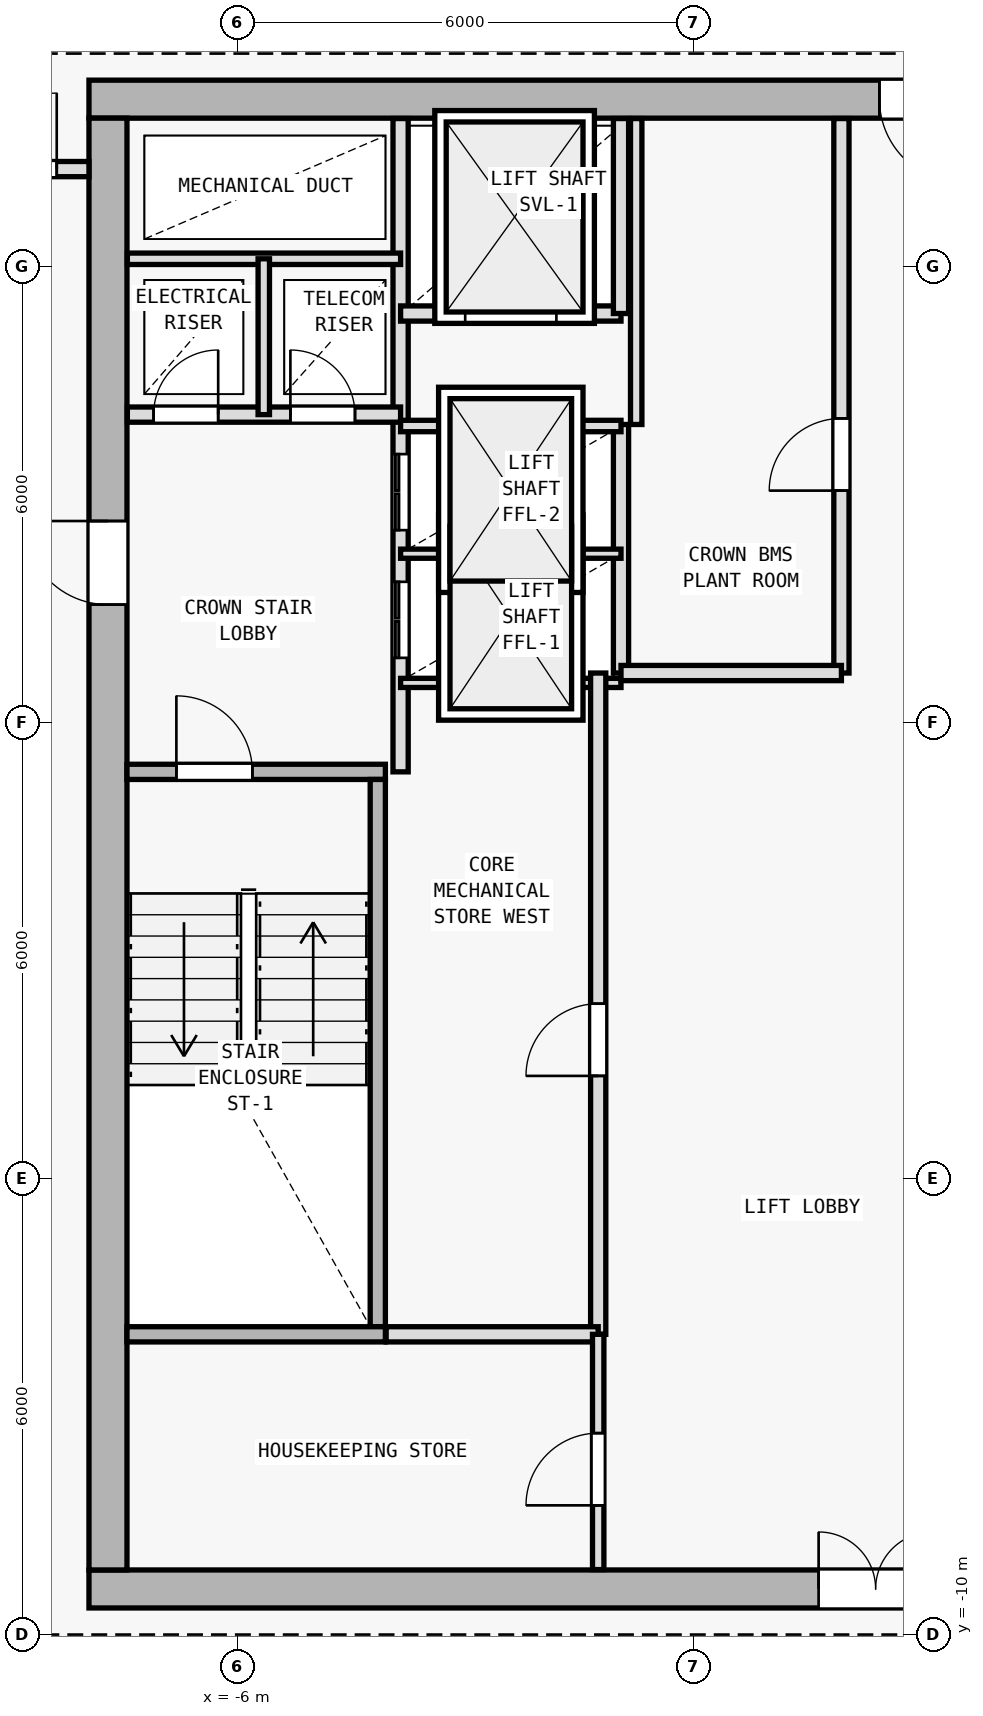
"""IFC4 building model, lengths in metres.
Left out: names, types, materials, properties, quantities, classifications, styles, units other than length and angle.
Written with IfcOpenShell. Run it as: python <this file> out.ifc"""

import sys

from ifc_helpers import new_model, si_unit, direction, frame, frame_2d, origin, origin_2d, place, context, subcontext, project, spatial, rectangle, i_section, extrude, element, fill, save


model = new_model("IFC4")
c1 = context("Model", 3, precision=1e-05, world=origin(), true_north=direction((0.0, 1.0)))
c2 = subcontext(c1, "Body", "Model", "MODEL_VIEW")
j1 = project(units=[si_unit("LENGTHUNIT", "METRE"), si_unit("PLANEANGLEUNIT", "RADIAN")], contexts=[c1])
p1 = place(None, origin())
s1 = spatial("IfcSite", under=j1, at=p1, CompositionType="ELEMENT")
p2 = place(p1, origin())
s2 = spatial("IfcBuilding", under=s1, at=p2, CompositionType="ELEMENT")
p3 = place(p2, frame((0.0, 0.0, 315.6)))
s3 = spatial("IfcBuildingStorey", under=s2, at=p3, CompositionType="ELEMENT", Elevation=315.6)
for number, where, z_axis, x_axis in (
    (1, (-7.7, -9.4, 0.0), (0.0, 0.0, 1.0), (1.0, 0.0, 0.0)),
    (2, (-7.7, 10.2, 0.0), (0.0, 0.0, 1.0), (1.0, 0.0, 0.0)),
    (3, (0.0, -9.4, 0.0), (0.0, 0.0, 1.0), (1.0, 0.0, 0.0)),
    (4, (-7.7, 2.0, 0.0), (0.0, 0.0, 1.0), (1.0, 0.0, 0.0)),
):
    element("IfcColumn", number, at=place(p3, frame(where, z_axis=z_axis, x_axis=x_axis)), inside=s3, PredefinedType="COLUMN", context=c2, shape_type="SweptSolid", body=[
        extrude(i_section(OverallWidth=0.374, OverallDepth=0.372, WebThickness=0.012, FlangeThickness=0.02, FilletRadius=0.015, at=origin_2d()), origin(), (0.0, 0.0, 1.0), 3.6),
    ])
p4 = place(p3, frame((-7.95, -9.4, 0.0), z_axis=(0.0, 0.0, 1.0), x_axis=(1.0, 0.0, 0.0)))
e5 = element("IfcWall", 5, at=p4, inside=s3, PredefinedType="SHEAR", context=c2, shape_type="SweptSolid", body=[
    extrude(rectangle(XDim=15.9, YDim=0.5, at=frame_2d((7.95, 0.0))), origin(), (0.0, 0.0, 1.0), 3.34),
])
p5 = place(p4, frame((9.6, 0.0, 0.0)))
e6 = element("IfcOpeningElement", 6, at=p5, cuts=e5, PredefinedType="OPENING", context=c2, shape_type="SweptSolid", body=[
    extrude(rectangle(XDim=1.5, YDim=2.2, at=frame_2d((0.75, 1.1))), frame((0.0, 0.26, 0.0), z_axis=(0.0, -1.0, 0.0), x_axis=(1.0, 0.0, 0.0)), (0.0, 0.0, 1.0), 0.52),
])
p6 = place(p3, frame((7.95, 10.2, 0.0), z_axis=(0.0, 0.0, 1.0), x_axis=(-1.0, 0.0, 0.0)))
e7 = element("IfcWall", 7, at=p6, inside=s3, PredefinedType="SHEAR", context=c2, shape_type="SweptSolid", body=[
    extrude(rectangle(XDim=15.9, YDim=0.5, at=frame_2d((7.95, 0.0))), origin(), (0.0, 0.0, 1.0), 3.34),
])
p7 = place(p6, frame((4.4, 0.0, 0.0)))
e8 = element("IfcOpeningElement", 8, at=p7, cuts=e7, PredefinedType="OPENING", context=c2, shape_type="SweptSolid", body=[
    extrude(rectangle(XDim=1.1, YDim=2.15, at=frame_2d((0.55, 1.075))), frame((0.0, 0.26, 0.0), z_axis=(0.0, -1.0, 0.0), x_axis=(1.0, 0.0, 0.0)), (0.0, 0.0, 1.0), 0.52),
])
p8 = place(p3, frame((-7.7, -9.15, 0.0), z_axis=(0.0, 0.0, 1.0), x_axis=(0.0, 1.0, 0.0)))
e9 = element("IfcWall", 9, at=p8, inside=s3, PredefinedType="SHEAR", context=c2, shape_type="SweptSolid", body=[
    extrude(rectangle(XDim=19.1, YDim=0.5, at=frame_2d((9.55, 0.0))), origin(), (0.0, 0.0, 1.0), 3.34),
])
p9 = place(p8, frame((12.7, 0.0, 0.0)))
e10 = element("IfcOpeningElement", 10, at=p9, cuts=e9, PredefinedType="OPENING", context=c2, shape_type="SweptSolid", body=[
    extrude(rectangle(XDim=1.1, YDim=2.15, at=frame_2d((0.55, 1.075))), frame((0.0, 0.26, 0.0), z_axis=(0.0, -1.0, 0.0), x_axis=(1.0, 0.0, 0.0)), (0.0, 0.0, 1.0), 0.52),
])
p10 = place(p3, frame((-7.45, 1.35, 0.0), z_axis=(0.0, 0.0, 1.0), x_axis=(1.0, 0.0, 0.0)))
e11 = element("IfcWall", 11, at=p10, inside=s3, PredefinedType="SOLIDWALL", context=c2, shape_type="SweptSolid", body=[
    extrude(rectangle(XDim=3.4, YDim=0.2, at=frame_2d((1.7, 0.0))), origin(), (0.0, 0.0, 1.0), 3.34),
])
p11 = place(p10, frame((0.65, 0.0, 0.0)))
e12 = element("IfcOpeningElement", 12, at=p11, cuts=e11, PredefinedType="OPENING", context=c2, shape_type="SweptSolid", body=[
    extrude(rectangle(XDim=1.0, YDim=2.15, at=frame_2d((0.5, 1.075))), frame((0.0, 0.11, 0.0), z_axis=(0.0, -1.0, 0.0), x_axis=(1.0, 0.0, 0.0)), (0.0, 0.0, 1.0), 0.22),
])
p12 = place(p3, frame((-4.15, -5.95, 0.0), z_axis=(0.0, 0.0, 1.0), x_axis=(0.0, 1.0, 0.0)))
e13 = element("IfcWall", 13, at=p12, inside=s3, PredefinedType="SOLIDWALL", context=c2, shape_type="SweptSolid", body=[
    extrude(rectangle(XDim=7.2, YDim=0.2, at=frame_2d((3.6, 0.0))), origin(), (0.0, 0.0, 1.0), 3.34),
])
p13 = place(p3, frame((-3.85, 1.35, 0.0), z_axis=(0.0, 0.0, 1.0), x_axis=(0.0, 1.0, 0.0)))
e14 = element("IfcWall", 14, at=p13, inside=s3, PredefinedType="SOLIDWALL", context=c2, shape_type="SweptSolid", body=[
    extrude(rectangle(XDim=8.595, YDim=0.2, at=frame_2d((4.297, 0.0))), origin(), (0.0, 0.0, 1.0), 3.34),
])
p14 = place(p13, frame((1.5, 0.0, 0.0)))
e15 = element("IfcOpeningElement", 15, at=p14, cuts=e14, PredefinedType="OPENING", context=c2, shape_type="SweptSolid", body=[
    extrude(rectangle(XDim=1.0, YDim=2.15, at=frame_2d((0.5, 1.075))), frame((0.0, 0.11, 0.0), z_axis=(0.0, -1.0, 0.0), x_axis=(1.0, 0.0, 0.0)), (0.0, 0.0, 1.0), 0.22),
])
p15 = place(p13, frame((3.18, 0.0, 0.0)))
e16 = element("IfcOpeningElement", 16, at=p15, cuts=e14, PredefinedType="OPENING", context=c2, shape_type="SweptSolid", body=[
    extrude(rectangle(XDim=1.0, YDim=2.15, at=frame_2d((0.5, 1.075))), frame((0.0, 0.11, 0.0), z_axis=(0.0, -1.0, 0.0), x_axis=(1.0, 0.0, 0.0)), (0.0, 0.0, 1.0), 0.22),
])
p16 = place(p3, frame((-7.445, 6.05, 0.0), z_axis=(0.0, 0.0, 1.0), x_axis=(1.0, 0.0, 0.0)))
e17 = element("IfcWall", 17, at=p16, inside=s3, PredefinedType="SOLIDWALL", context=c2, shape_type="SweptSolid", body=[
    extrude(rectangle(XDim=3.595, YDim=0.2, at=frame_2d((1.797, 0.0))), origin(), (0.0, 0.0, 1.0), 3.34),
])
p17 = place(p16, frame((0.345, 0.0, 0.0)))
e18 = element("IfcOpeningElement", 18, at=p17, cuts=e17, PredefinedType="OPENING", context=c2, shape_type="SweptSolid", body=[
    extrude(rectangle(XDim=0.85, YDim=2.1, at=frame_2d((0.425, 1.05))), frame((0.0, 0.11, 0.0), z_axis=(0.0, -1.0, 0.0), x_axis=(1.0, 0.0, 0.0)), (0.0, 0.0, 1.0), 0.22),
])
p18 = place(p16, frame((2.145, 0.0, 0.0)))
e19 = element("IfcOpeningElement", 19, at=p18, cuts=e17, PredefinedType="OPENING", context=c2, shape_type="SweptSolid", body=[
    extrude(rectangle(XDim=0.85, YDim=2.1, at=frame_2d((0.425, 1.05))), frame((0.0, 0.11, 0.0), z_axis=(0.0, -1.0, 0.0), x_axis=(1.0, 0.0, 0.0)), (0.0, 0.0, 1.0), 0.22),
])
p19 = place(p3, frame((-7.445, 8.1, 0.0), z_axis=(0.0, 0.0, 1.0), x_axis=(1.0, 0.0, 0.0)))
e20 = element("IfcWall", 20, at=p19, inside=s3, PredefinedType="PARTITIONING", context=c2, shape_type="SweptSolid", body=[
    extrude(rectangle(XDim=3.595, YDim=0.15, at=frame_2d((1.797, 0.0))), origin(), (0.0, 0.0, 1.0), 3.34),
])
p20 = place(p3, frame((-5.65, 6.05, 0.0), z_axis=(0.0, 0.0, 1.0), x_axis=(0.0, 1.0, 0.0)))
e21 = element("IfcWall", 21, at=p20, inside=s3, PredefinedType="PARTITIONING", context=c2, shape_type="SweptSolid", body=[
    extrude(rectangle(XDim=2.05, YDim=0.15, at=frame_2d((1.025, 0.0))), origin(), (0.0, 0.0, 1.0), 3.34),
])
p21 = place(p3, frame((-0.95, 2.65, 0.0), z_axis=(0.0, 0.0, 1.0), x_axis=(0.0, 1.0, 0.0)))
e22 = element("IfcWall", 22, at=p21, inside=s3, PredefinedType="SOLIDWALL", context=c2, shape_type="SweptSolid", body=[
    extrude(rectangle(XDim=3.27, YDim=0.2, at=frame_2d((1.635, 0.0))), origin(), (0.0, 0.0, 1.0), 3.34),
])
for number, where, z_axis, x_axis in (
    (23, (-3.85, 2.52, 0.0), (0.0, 0.0, 1.0), (1.0, 0.0, 0.0)),
    (24, (-3.85, 4.22, 0.0), (0.0, 0.0, 1.0), (1.0, 0.0, 0.0)),
):
    element("IfcWall", number, at=place(p3, frame(where, z_axis=z_axis, x_axis=x_axis)), inside=s3, PredefinedType="PARTITIONING", context=c2, shape_type="SweptSolid", body=[
        extrude(rectangle(XDim=2.9, YDim=0.12, at=frame_2d((1.45, 0.0))), origin(), (0.0, 0.0, 1.0), 3.34),
    ])
p22 = place(p3, frame((-3.85, 5.9, 0.0), z_axis=(0.0, 0.0, 1.0), x_axis=(1.0, 0.0, 0.0)))
e25 = element("IfcWall", 25, at=p22, inside=s3, PredefinedType="PARTITIONING", context=c2, shape_type="SweptSolid", body=[
    extrude(rectangle(XDim=2.9, YDim=0.15, at=frame_2d((1.45, 0.0))), origin(), (0.0, 0.0, 1.0), 3.34),
])
p23 = place(p3, frame((-3.85, 7.38, 0.0), z_axis=(0.0, 0.0, 1.0), x_axis=(1.0, 0.0, 0.0)))
e26 = element("IfcWall", 26, at=p23, inside=s3, PredefinedType="SOLIDWALL", context=c2, shape_type="SweptSolid", body=[
    extrude(rectangle(XDim=2.9, YDim=0.2, at=frame_2d((1.45, 0.0))), origin(), (0.0, 0.0, 1.0), 3.34),
])
p24 = place(p23, frame((0.85, 0.0, 0.0)))
e27 = element("IfcOpeningElement", 27, at=p24, cuts=e26, PredefinedType="OPENING", context=c2, shape_type="SweptSolid", body=[
    extrude(rectangle(XDim=1.2, YDim=2.2, at=frame_2d((0.6, 1.1))), frame((0.0, 0.11, 0.0), z_axis=(0.0, -1.0, 0.0), x_axis=(1.0, 0.0, 0.0)), (0.0, 0.0, 1.0), 0.22),
])
p25 = place(p3, frame((-0.95, 7.38, 0.0), z_axis=(0.0, 0.0, 1.0), x_axis=(0.0, 1.0, 0.0)))
e28 = element("IfcWall", 28, at=p25, inside=s3, PredefinedType="SOLIDWALL", context=c2, shape_type="SweptSolid", body=[
    extrude(rectangle(XDim=2.565, YDim=0.2, at=frame_2d((1.283, 0.0))), origin(), (0.0, 0.0, 1.0), 3.34),
])
p26 = place(p3, frame((-1.25, -6.05, 0.0), z_axis=(0.0, 0.0, 1.0), x_axis=(0.0, 1.0, 0.0)))
e29 = element("IfcWall", 29, at=p26, inside=s3, PredefinedType="SOLIDWALL", context=c2, shape_type="SweptSolid", body=[
    extrude(rectangle(XDim=8.7, YDim=0.2, at=frame_2d((4.35, 0.0))), origin(), (0.0, 0.0, 1.0), 3.34),
])
p27 = place(p26, frame((3.4, 0.0, 0.0)))
e30 = element("IfcOpeningElement", 30, at=p27, cuts=e29, PredefinedType="OPENING", context=c2, shape_type="SweptSolid", body=[
    extrude(rectangle(XDim=0.95, YDim=2.1, at=frame_2d((0.475, 1.05))), frame((0.0, 0.11, 0.0), z_axis=(0.0, -1.0, 0.0), x_axis=(1.0, 0.0, 0.0)), (0.0, 0.0, 1.0), 0.22),
])
p28 = place(p3, frame((1.95, 2.65, 0.0), z_axis=(0.0, 0.0, 1.0), x_axis=(0.0, 1.0, 0.0)))
e31 = element("IfcWall", 31, at=p28, inside=s3, PredefinedType="SOLIDWALL", context=c2, shape_type="SweptSolid", body=[
    extrude(rectangle(XDim=7.295, YDim=0.2, at=frame_2d((3.647, 0.0))), origin(), (0.0, 0.0, 1.0), 3.34),
])
p29 = place(p28, frame((2.4, 0.0, 0.0)))
e32 = element("IfcOpeningElement", 32, at=p29, cuts=e31, PredefinedType="OPENING", context=c2, shape_type="SweptSolid", body=[
    extrude(rectangle(XDim=0.95, YDim=2.1, at=frame_2d((0.475, 1.05))), frame((0.0, 0.11, 0.0), z_axis=(0.0, -1.0, 0.0), x_axis=(1.0, 0.0, 0.0)), (0.0, 0.0, 1.0), 0.22),
])
p30 = place(p3, frame((-0.95, 2.65, 0.0), z_axis=(0.0, 0.0, 1.0), x_axis=(1.0, 0.0, 0.0)))
e33 = element("IfcWall", 33, at=p30, inside=s3, PredefinedType="SOLIDWALL", context=c2, shape_type="SweptSolid", body=[
    extrude(rectangle(XDim=2.9, YDim=0.2, at=frame_2d((1.45, 0.0))), origin(), (0.0, 0.0, 1.0), 3.34),
])
p31 = place(p3, frame((-0.75, 5.92, 0.0), z_axis=(0.0, 0.0, 1.0), x_axis=(0.0, 1.0, 0.0)))
e34 = element("IfcWall", 34, at=p31, inside=s3, PredefinedType="PARTITIONING", context=c2, shape_type="SweptSolid", body=[
    extrude(rectangle(XDim=4.025, YDim=0.15, at=frame_2d((2.013, 0.0))), origin(), (0.0, 0.0, 1.0), 3.34),
])
p32 = place(p3, frame((-7.45, -6.05, 0.0), z_axis=(0.0, 0.0, 1.0), x_axis=(1.0, 0.0, 0.0)))
e35 = element("IfcWall", 35, at=p32, inside=s3, PredefinedType="SOLIDWALL", context=c2, shape_type="SweptSolid", body=[
    extrude(rectangle(XDim=3.4, YDim=0.2, at=frame_2d((1.7, 0.0))), origin(), (0.0, 0.0, 1.0), 3.34),
])
p33 = place(p3, frame((-4.04, -6.05, 0.0), z_axis=(0.0, 0.0, 1.0), x_axis=(1.0, 0.0, 0.0)))
e36 = element("IfcWall", 36, at=p33, inside=s3, PredefinedType="SOLIDWALL", context=c2, shape_type="SweptSolid", body=[
    extrude(rectangle(XDim=2.79, YDim=0.2, at=frame_2d((1.395, 0.0))), origin(), (0.0, 0.0, 1.0), 3.34),
])
p34 = place(p3, frame((-1.25, -9.145, 0.0), z_axis=(0.0, 0.0, 1.0), x_axis=(0.0, 1.0, 0.0)))
e37 = element("IfcWall", 37, at=p34, inside=s3, PredefinedType="PARTITIONING", context=c2, shape_type="SweptSolid", body=[
    extrude(rectangle(XDim=3.095, YDim=0.15, at=frame_2d((1.547, 0.0))), origin(), (0.0, 0.0, 1.0), 3.34),
])
p35 = place(p34, frame((0.845, 0.0, 0.0)))
e38 = element("IfcOpeningElement", 38, at=p35, cuts=e37, PredefinedType="OPENING", context=c2, shape_type="SweptSolid", body=[
    extrude(rectangle(XDim=0.95, YDim=2.1, at=frame_2d((0.475, 1.05))), frame((0.0, 0.085, 0.0), z_axis=(0.0, -1.0, 0.0), x_axis=(1.0, 0.0, 0.0)), (0.0, 0.0, 1.0), 0.17),
])
p36 = place(p3, frame((-9.848, 9.28, 0.0), z_axis=(0.0, 0.0, 1.0), x_axis=(1.0, 0.0, 0.0)))
e39 = element("IfcWall", 39, at=p36, inside=s3, PredefinedType="SOLIDWALL", context=c2, shape_type="SweptSolid", body=[
    extrude(rectangle(XDim=1.898, YDim=0.2, at=frame_2d((0.949, 0.0))), origin(), (0.0, 0.0, 1.0), 3.34),
])
p37 = place(p36, frame((0.474, 0.0, 0.0)))
e40 = element("IfcOpeningElement", 40, at=p37, cuts=e39, PredefinedType="OPENING", context=c2, shape_type="SweptSolid", body=[
    extrude(rectangle(XDim=1.0, YDim=2.15, at=frame_2d((0.5, 1.075))), frame((0.0, 0.11, 0.0), z_axis=(0.0, -1.0, 0.0), x_axis=(1.0, 0.0, 0.0)), (0.0, 0.0, 1.0), 0.22),
])
p38 = place(p5, origin())
e41 = element("IfcDoor", 41, at=p38, inside=s3, OperationType="DOUBLE_DOOR_SINGLE_SWING", PredefinedType="DOOR", context=c2, shape_type="SweptSolid", body=[
    extrude(rectangle(XDim=1.5, YDim=2.2, at=frame_2d((0.75, 1.1))), frame((0.0, 0.025, 0.0), z_axis=(0.0, -1.0, 0.0), x_axis=(1.0, 0.0, 0.0)), (0.0, 0.0, 1.0), 0.05),
])
fill(e6, e41)
p39 = place(p9, origin())
e42 = element("IfcDoor", 42, at=p39, inside=s3, OperationType="SINGLE_SWING_RIGHT", PredefinedType="DOOR", context=c2, shape_type="SweptSolid", body=[
    extrude(rectangle(XDim=1.1, YDim=2.15, at=frame_2d((0.55, 1.075))), frame((0.0, 0.025, 0.0), z_axis=(0.0, -1.0, 0.0), x_axis=(1.0, 0.0, 0.0)), (0.0, 0.0, 1.0), 0.05),
])
fill(e10, e42)
p40 = place(p7, origin())
e43 = element("IfcDoor", 43, at=p40, inside=s3, OperationType="SINGLE_SWING_LEFT", PredefinedType="DOOR", context=c2, shape_type="SweptSolid", body=[
    extrude(rectangle(XDim=1.1, YDim=2.15, at=frame_2d((0.55, 1.075))), frame((0.0, 0.025, 0.0), z_axis=(0.0, -1.0, 0.0), x_axis=(1.0, 0.0, 0.0)), (0.0, 0.0, 1.0), 0.05),
])
fill(e8, e43)
p41 = place(p11, origin())
e44 = element("IfcDoor", 44, at=p41, inside=s3, OperationType="SINGLE_SWING_LEFT", PredefinedType="DOOR", context=c2, shape_type="SweptSolid", body=[
    extrude(rectangle(XDim=1.0, YDim=2.15, at=frame_2d((0.5, 1.075))), frame((0.0, 0.025, 0.0), z_axis=(0.0, -1.0, 0.0), x_axis=(1.0, 0.0, 0.0)), (0.0, 0.0, 1.0), 0.05),
])
fill(e12, e44)
p42 = place(p17, origin())
e45 = element("IfcDoor", 45, at=p42, inside=s3, OperationType="SINGLE_SWING_RIGHT", PredefinedType="DOOR", context=c2, shape_type="SweptSolid", body=[
    extrude(rectangle(XDim=0.85, YDim=2.1, at=frame_2d((0.425, 1.05))), frame((0.0, 0.025, 0.0), z_axis=(0.0, -1.0, 0.0), x_axis=(1.0, 0.0, 0.0)), (0.0, 0.0, 1.0), 0.05),
])
fill(e18, e45)
p43 = place(p18, origin())
e46 = element("IfcDoor", 46, at=p43, inside=s3, OperationType="SINGLE_SWING_LEFT", PredefinedType="DOOR", context=c2, shape_type="SweptSolid", body=[
    extrude(rectangle(XDim=0.85, YDim=2.1, at=frame_2d((0.425, 1.05))), frame((0.0, 0.025, 0.0), z_axis=(0.0, -1.0, 0.0), x_axis=(1.0, 0.0, 0.0)), (0.0, 0.0, 1.0), 0.05),
])
fill(e19, e46)
p44 = place(p24, origin())
e47 = element("IfcDoor", 47, at=p44, inside=s3, OperationType="DOUBLE_DOOR_SLIDING", PredefinedType="DOOR", context=c2, shape_type="SweptSolid", body=[
    extrude(rectangle(XDim=1.2, YDim=2.2, at=frame_2d((0.6, 1.1))), frame((0.0, 0.025, 0.0), z_axis=(0.0, -1.0, 0.0), x_axis=(1.0, 0.0, 0.0)), (0.0, 0.0, 1.0), 0.05),
])
fill(e27, e47)
p45 = place(p27, origin())
e48 = element("IfcDoor", 48, at=p45, inside=s3, OperationType="SINGLE_SWING_LEFT", PredefinedType="DOOR", context=c2, shape_type="SweptSolid", body=[
    extrude(rectangle(XDim=0.95, YDim=2.1, at=frame_2d((0.475, 1.05))), frame((0.0, 0.025, 0.0), z_axis=(0.0, -1.0, 0.0), x_axis=(1.0, 0.0, 0.0)), (0.0, 0.0, 1.0), 0.05),
])
fill(e30, e48)
p46 = place(p29, origin())
e49 = element("IfcDoor", 49, at=p46, inside=s3, OperationType="SINGLE_SWING_LEFT", PredefinedType="DOOR", context=c2, shape_type="SweptSolid", body=[
    extrude(rectangle(XDim=0.95, YDim=2.1, at=frame_2d((0.475, 1.05))), frame((0.0, 0.025, 0.0), z_axis=(0.0, -1.0, 0.0), x_axis=(1.0, 0.0, 0.0)), (0.0, 0.0, 1.0), 0.05),
])
fill(e32, e49)
p47 = place(p14, origin())
e50 = element("IfcDoor", 50, at=p47, inside=s3, OperationType="DOUBLE_DOOR_SLIDING", PredefinedType="DOOR", context=c2, shape_type="SweptSolid", body=[
    extrude(rectangle(XDim=1.0, YDim=2.15, at=frame_2d((0.5, 1.075))), frame((0.0, 0.025, 0.0), z_axis=(0.0, -1.0, 0.0), x_axis=(1.0, 0.0, 0.0)), (0.0, 0.0, 1.0), 0.05),
])
fill(e15, e50)
p48 = place(p15, origin())
e51 = element("IfcDoor", 51, at=p48, inside=s3, OperationType="DOUBLE_DOOR_SLIDING", PredefinedType="DOOR", context=c2, shape_type="SweptSolid", body=[
    extrude(rectangle(XDim=1.0, YDim=2.15, at=frame_2d((0.5, 1.075))), frame((0.0, 0.025, 0.0), z_axis=(0.0, -1.0, 0.0), x_axis=(1.0, 0.0, 0.0)), (0.0, 0.0, 1.0), 0.05),
])
fill(e16, e51)
p49 = place(p35, origin())
e52 = element("IfcDoor", 52, at=p49, inside=s3, OperationType="SINGLE_SWING_LEFT", PredefinedType="DOOR", context=c2, shape_type="SweptSolid", body=[
    extrude(rectangle(XDim=0.95, YDim=2.1, at=frame_2d((0.475, 1.05))), frame((0.0, 0.025, 0.0), z_axis=(0.0, -1.0, 0.0), x_axis=(1.0, 0.0, 0.0)), (0.0, 0.0, 1.0), 0.05),
])
fill(e38, e52)
p50 = place(p37, origin())
e53 = element("IfcDoor", 53, at=p50, inside=s3, OperationType="SINGLE_SWING_RIGHT", PredefinedType="DOOR", context=c2, shape_type="SweptSolid", body=[
    extrude(rectangle(XDim=1.0, YDim=2.15, at=frame_2d((0.5, 1.075))), frame((0.0, 0.025, 0.0), z_axis=(0.0, -1.0, 0.0), x_axis=(1.0, 0.0, 0.0)), (0.0, 0.0, 1.0), 0.05),
])
fill(e40, e53)
save(model, sys.argv[1])
